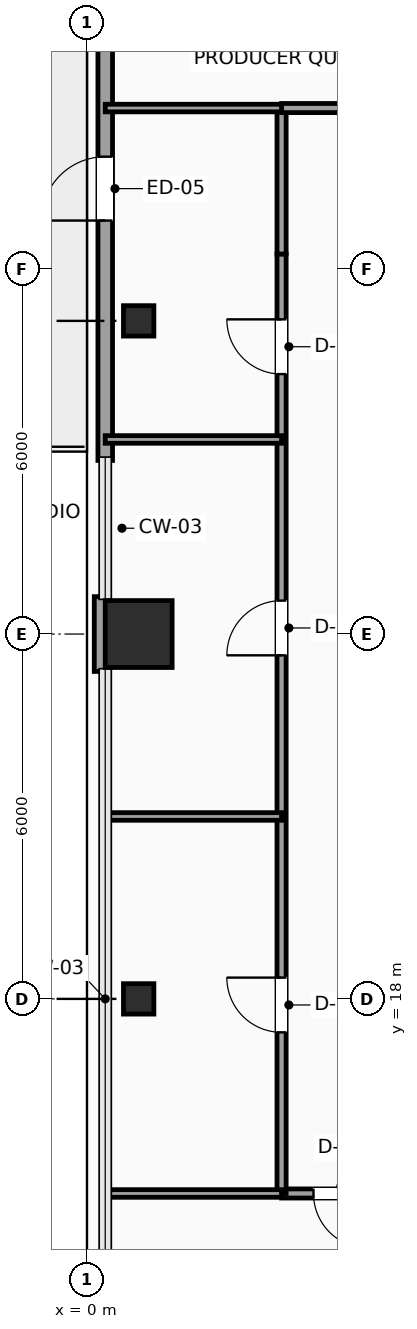
"""IFC4 building model, lengths in metres.
Left out: names, types, materials, properties, quantities, classifications, styles, units other than length and angle.
Written with IfcOpenShell. Run it as: python <this file> out.ifc"""

import sys

from ifc_helpers import new_model, si_unit, direction, frame, frame_2d, origin, origin_2d, place, context, subcontext, project, spatial, rectangle, hollow_rectangle, extrude, element, fill, save


model = new_model("IFC4")
c1 = context("Model", 3, precision=1e-05, world=origin(), true_north=direction((0.0, 1.0)))
c2 = subcontext(c1, "Body", "Model", "MODEL_VIEW")
j1 = project(units=[si_unit("LENGTHUNIT", "METRE"), si_unit("PLANEANGLEUNIT", "RADIAN")], contexts=[c1])
p1 = place(None, origin())
s1 = spatial("IfcSite", under=j1, at=p1, CompositionType="ELEMENT")
p2 = place(p1, origin())
s2 = spatial("IfcBuilding", under=s1, at=p2, CompositionType="ELEMENT")
p3 = place(p2, frame((0.0, 0.0, 103.35)))
s3 = spatial("IfcBuildingStorey", under=s2, at=p3, CompositionType="ELEMENT", Elevation=103.35)
p4 = place(p3, frame((0.85, 18.0, 0.0), z_axis=(0.0, 0.0, 1.0), x_axis=(1.0, 0.0, 0.0)))
e1 = element("IfcColumn", 1, at=p4, inside=s3, PredefinedType="COLUMN", context=c2, shape_type="SweptSolid", body=[
    extrude(hollow_rectangle(XDim=0.5, YDim=0.5, WallThickness=0.025, InnerFilletRadius=0.025, OuterFilletRadius=0.04, at=origin_2d()), origin(), (0.0, 0.0, 1.0), 3.75),
])
p5 = place(p3, frame((0.85, 24.0, 0.0), z_axis=(0.0, 0.0, 1.0), x_axis=(1.0, 0.0, 0.0)))
e2 = element("IfcColumn", 2, at=p5, inside=s3, PredefinedType="COLUMN", context=c2, shape_type="SweptSolid", body=[
    extrude(rectangle(XDim=1.1, YDim=1.1, at=origin_2d()), origin(), (0.0, 0.0, 1.0), 3.75),
])
p6 = place(p3, frame((0.85, 29.15, 0.0), z_axis=(0.0, 0.0, 1.0), x_axis=(1.0, 0.0, 0.0)))
e3 = element("IfcColumn", 3, at=p6, inside=s3, PredefinedType="COLUMN", context=c2, shape_type="SweptSolid", body=[
    extrude(hollow_rectangle(XDim=0.5, YDim=0.5, WallThickness=0.025, InnerFilletRadius=0.025, OuterFilletRadius=0.04, at=origin_2d()), origin(), (0.0, 0.0, 1.0), 3.75),
])
p7 = place(p3, frame((0.3, 26.855, 0.0), z_axis=(0.0, 0.0, 1.0), x_axis=(0.0, 1.0, 0.0)))
e4 = element("IfcWall", 4, at=p7, inside=s3, PredefinedType="SOLIDWALL", context=c2, shape_type="SweptSolid", body=[
    extrude(rectangle(XDim=9.29, YDim=0.24, at=frame_2d((4.645, 0.0))), origin(), (0.0, 0.0, 1.0), 3.525),
])
p8 = place(p7, frame((3.945, 0.0, 0.0)))
e5 = element("IfcOpeningElement", 5, at=p8, cuts=e4, PredefinedType="OPENING", context=c2, shape_type="SweptSolid", body=[
    extrude(rectangle(XDim=1.05, YDim=2.2, at=frame_2d((0.525, 1.1))), frame((0.0, 0.13, 0.0), z_axis=(0.0, -1.0, 0.0), x_axis=(1.0, 0.0, 0.0)), (0.0, 0.0, 1.0), 0.26),
])
p9 = place(p3, frame((0.24, 23.385, 0.0), z_axis=(0.0, 0.0, 1.0), x_axis=(0.0, 1.0, 0.0)))
e6 = element("IfcWall", 6, at=p9, inside=s3, PredefinedType="SOLIDWALL", context=c2, shape_type="SweptSolid", body=[
    extrude(rectangle(XDim=1.23, YDim=0.24, at=frame_2d((0.615, 0.0))), origin(), (0.0, 0.0, 1.0), 3.525),
])
p10 = place(p3, frame((5.15, 14.8, 0.0), z_axis=(0.0, 0.0, 1.0), x_axis=(-1.0, 0.0, 0.0)))
e7 = element("IfcWall", 7, at=p10, inside=s3, PredefinedType="PARTITIONING", context=c2, shape_type="SweptSolid", body=[
    extrude(rectangle(XDim=1.95, YDim=0.15, at=frame_2d((0.975, 0.0))), origin(), (0.0, 0.0, 1.0), 3.067),
])
p11 = place(p10, frame((0.525, 0.0, 0.0)))
e8 = element("IfcOpeningElement", 8, at=p11, cuts=e7, PredefinedType="OPENING", context=c2, shape_type="SweptSolid", body=[
    extrude(rectangle(XDim=0.9, YDim=2.1, at=frame_2d((0.45, 1.05))), frame((0.0, 0.085, 0.0), z_axis=(0.0, -1.0, 0.0), x_axis=(1.0, 0.0, 0.0)), (0.0, 0.0, 1.0), 0.17),
])
p12 = place(p3, frame((3.2, 14.8, 0.0), z_axis=(0.0, 0.0, 1.0), x_axis=(0.0, 1.0, 0.0)))
e9 = element("IfcWall", 9, at=p12, inside=s3, PredefinedType="PARTITIONING", context=c2, shape_type="SweptSolid", body=[
    extrude(rectangle(XDim=15.45, YDim=0.15, at=frame_2d((7.725, 0.0))), origin(), (0.0, 0.0, 1.0), 3.525),
])
p13 = place(p12, frame((2.65, 0.0, 0.0)))
e10 = element("IfcOpeningElement", 10, at=p13, cuts=e9, PredefinedType="OPENING", context=c2, shape_type="SweptSolid", body=[
    extrude(rectangle(XDim=0.9, YDim=2.1, at=frame_2d((0.45, 1.05))), frame((0.0, 0.085, 0.0), z_axis=(0.0, -1.0, 0.0), x_axis=(1.0, 0.0, 0.0)), (0.0, 0.0, 1.0), 0.17),
])
p14 = place(p12, frame((8.85, 0.0, 0.0)))
e11 = element("IfcOpeningElement", 11, at=p14, cuts=e9, PredefinedType="OPENING", context=c2, shape_type="SweptSolid", body=[
    extrude(rectangle(XDim=0.9, YDim=2.1, at=frame_2d((0.45, 1.05))), frame((0.0, 0.085, 0.0), z_axis=(0.0, -1.0, 0.0), x_axis=(1.0, 0.0, 0.0)), (0.0, 0.0, 1.0), 0.17),
])
p15 = place(p12, frame((13.475, 0.0, 0.0)))
e12 = element("IfcOpeningElement", 12, at=p15, cuts=e9, PredefinedType="OPENING", context=c2, shape_type="SweptSolid", body=[
    extrude(rectangle(XDim=0.9, YDim=2.1, at=frame_2d((0.45, 1.05))), frame((0.0, 0.085, 0.0), z_axis=(0.0, -1.0, 0.0), x_axis=(1.0, 0.0, 0.0)), (0.0, 0.0, 1.0), 0.17),
])
p16 = place(p3, frame((3.2, 30.25, 0.0), z_axis=(0.0, 0.0, 1.0), x_axis=(0.0, 1.0, 0.0)))
e13 = element("IfcWall", 13, at=p16, inside=s3, PredefinedType="PARTITIONING", context=c2, shape_type="SweptSolid", body=[
    extrude(rectangle(XDim=2.4, YDim=0.15, at=frame_2d((1.2, 0.0))), origin(), (0.0, 0.0, 1.0), 3.525),
])
p17 = place(p3, frame((3.2, 32.65, 0.0), z_axis=(0.0, 0.0, 1.0), x_axis=(1.0, 0.0, 0.0)))
e14 = element("IfcWall", 14, at=p17, inside=s3, PredefinedType="PARTITIONING", context=c2, shape_type="SweptSolid", body=[
    extrude(rectangle(XDim=2.05, YDim=0.15, at=frame_2d((1.025, 0.0))), origin(), (0.0, 0.0, 1.0), 3.525),
])
p18 = place(p3, frame((0.308, 12.615, 0.0), z_axis=(0.0, 0.0, 1.0), x_axis=(-0.003463666374, 0.99999400149, 0.0)))
e15 = element("IfcWall", 15, at=p18, inside=s3, PredefinedType="PARTITIONING", context=c2, shape_type="SweptSolid", body=[
    extrude(rectangle(XDim=2.185, YDim=0.125, at=frame_2d((1.093, 0.0))), origin(), (0.0, 0.0, 1.0), 3.525),
])
for number, where, z_axis, x_axis in (
    (16, (0.3, 14.8, 0.0), (0.0, 0.0, 1.0), (1.0, 0.0, 0.0)),
    (17, (0.3, 21.0, 0.0), (0.0, 0.0, 1.0), (1.0, 0.0, 0.0)),
):
    element("IfcWall", number, at=place(p3, frame(where, z_axis=z_axis, x_axis=x_axis)), inside=s3, PredefinedType="PARTITIONING", context=c2, shape_type="SweptSolid", body=[
        extrude(rectangle(XDim=2.9, YDim=0.125, at=frame_2d((1.45, 0.0))), origin(), (0.0, 0.0, 1.0), 3.067),
    ])
for number, where, z_axis, x_axis in (
    (18, (0.3, 27.2, 0.0), (0.0, 0.0, 1.0), (1.0, 0.0, 0.0)),
    (19, (0.3, 32.65, 0.0), (0.0, 0.0, 1.0), (1.0, 0.0, 0.0)),
):
    element("IfcWall", number, at=place(p3, frame(where, z_axis=z_axis, x_axis=x_axis)), inside=s3, PredefinedType="PARTITIONING", context=c2, shape_type="SweptSolid", body=[
        extrude(rectangle(XDim=2.9, YDim=0.125, at=frame_2d((1.45, 0.0))), origin(), (0.0, 0.0, 1.0), 3.525),
    ])
p19 = place(p8, origin())
e20 = element("IfcDoor", 20, at=p19, inside=s3, OperationType="SINGLE_SWING_LEFT", PredefinedType="DOOR", context=c2, shape_type="SweptSolid", body=[
    extrude(rectangle(XDim=1.05, YDim=2.2, at=frame_2d((0.525, 1.1))), frame((0.0, 0.025, 0.0), z_axis=(0.0, -1.0, 0.0), x_axis=(1.0, 0.0, 0.0)), (0.0, 0.0, 1.0), 0.05),
])
fill(e5, e20)
p20 = place(p11, origin())
e21 = element("IfcDoor", 21, at=p20, inside=s3, OperationType="SINGLE_SWING_LEFT", PredefinedType="DOOR", context=c2, shape_type="SweptSolid", body=[
    extrude(rectangle(XDim=0.9, YDim=2.1, at=frame_2d((0.45, 1.05))), frame((0.0, 0.025, 0.0), z_axis=(0.0, -1.0, 0.0), x_axis=(1.0, 0.0, 0.0)), (0.0, 0.0, 1.0), 0.05),
])
fill(e8, e21)
p21 = place(p13, origin())
e22 = element("IfcDoor", 22, at=p21, inside=s3, OperationType="SINGLE_SWING_RIGHT", PredefinedType="DOOR", context=c2, shape_type="SweptSolid", body=[
    extrude(rectangle(XDim=0.9, YDim=2.1, at=frame_2d((0.45, 1.05))), frame((0.0, 0.025, 0.0), z_axis=(0.0, -1.0, 0.0), x_axis=(1.0, 0.0, 0.0)), (0.0, 0.0, 1.0), 0.05),
])
fill(e10, e22)
p22 = place(p14, origin())
e23 = element("IfcDoor", 23, at=p22, inside=s3, OperationType="SINGLE_SWING_LEFT", PredefinedType="DOOR", context=c2, shape_type="SweptSolid", body=[
    extrude(rectangle(XDim=0.9, YDim=2.1, at=frame_2d((0.45, 1.05))), frame((0.0, 0.025, 0.0), z_axis=(0.0, -1.0, 0.0), x_axis=(1.0, 0.0, 0.0)), (0.0, 0.0, 1.0), 0.05),
])
fill(e11, e23)
p23 = place(p15, origin())
e24 = element("IfcDoor", 24, at=p23, inside=s3, OperationType="SINGLE_SWING_RIGHT", PredefinedType="DOOR", context=c2, shape_type="SweptSolid", body=[
    extrude(rectangle(XDim=0.9, YDim=2.1, at=frame_2d((0.45, 1.05))), frame((0.0, 0.025, 0.0), z_axis=(0.0, -1.0, 0.0), x_axis=(1.0, 0.0, 0.0)), (0.0, 0.0, 1.0), 0.05),
])
fill(e12, e24)
save(model, sys.argv[1])
